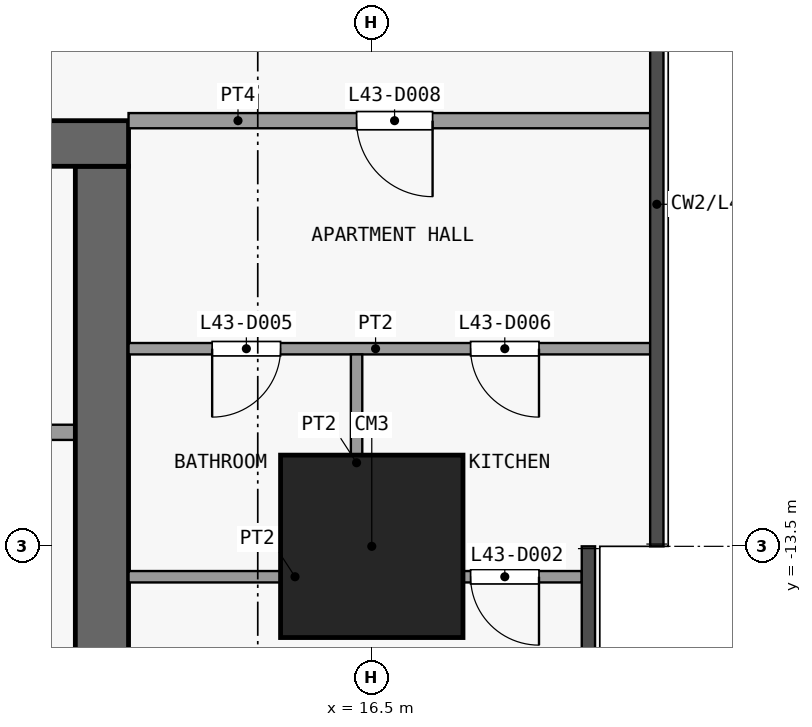
"""IFC4 building model, lengths in metres.
Left out: names, types, materials, properties, quantities, classifications, styles, units other than length and angle.
Written with IfcOpenShell. Run it as: python <this file> out.ifc"""

import sys

from ifc_helpers import new_model, si_unit, direction, frame, frame_2d, origin, origin_2d, place, context, subcontext, project, spatial, rectangle, extrude, element, fill, save


model = new_model("IFC4")
c1 = context("Model", 3, precision=1e-05, world=origin(), true_north=direction((0.0, 1.0)))
c2 = subcontext(c1, "Body", "Model", "MODEL_VIEW")
j1 = project(units=[si_unit("LENGTHUNIT", "METRE"), si_unit("PLANEANGLEUNIT", "RADIAN")], contexts=[c1])
p1 = place(None, origin())
s1 = spatial("IfcSite", under=j1, at=p1, CompositionType="ELEMENT")
p2 = place(p1, origin())
s2 = spatial("IfcBuilding", under=s1, at=p2, CompositionType="ELEMENT")
p3 = place(p2, frame((0.0, 0.0, 174.5)))
s3 = spatial("IfcBuildingStorey", under=s2, at=p3, CompositionType="ELEMENT", Elevation=174.5)
p4 = place(p3, frame((16.5, -13.5, 0.0), z_axis=(0.0, 0.0, 1.0), x_axis=(1.0, 0.0, 0.0)))
e1 = element("IfcColumn", 1, at=p4, inside=s3, PredefinedType="COLUMN", context=c2, shape_type="SweptSolid", body=[
    extrude(rectangle(XDim=2.4, YDim=2.4, at=origin_2d()), origin(), (0.0, 0.0, 1.0), 3.6),
])
p5 = place(p3, frame((-13.3, -8.2, 0.0), z_axis=(0.0, 0.0, 1.0), x_axis=(1.0, 0.0, 0.0)))
e2 = element("IfcWall", 2, at=p5, inside=s3, PredefinedType="SHEAR", context=c2, shape_type="SweptSolid", body=[
    extrude(rectangle(XDim=26.6, YDim=0.6, at=frame_2d((13.3, 0.0))), origin(), (0.0, 0.0, 1.0), 3.3),
])
p6 = place(p5, frame((7.6, 0.0, 0.0)))
e3 = element("IfcOpeningElement", 3, at=p6, cuts=e2, PredefinedType="OPENING", context=c2, shape_type="SweptSolid", body=[
    extrude(rectangle(XDim=1.8, YDim=2.1, at=frame_2d((0.9, 1.05))), frame((0.0, 0.31, 0.0), z_axis=(0.0, -1.0, 0.0), x_axis=(1.0, 0.0, 0.0)), (0.0, 0.0, 1.0), 0.62),
])
p7 = place(p5, frame((17.2, 0.0, 0.0)))
e4 = element("IfcOpeningElement", 4, at=p7, cuts=e2, PredefinedType="OPENING", context=c2, shape_type="SweptSolid", body=[
    extrude(rectangle(XDim=1.8, YDim=2.1, at=frame_2d((0.9, 1.05))), frame((0.0, 0.31, 0.0), z_axis=(0.0, -1.0, 0.0), x_axis=(1.0, 0.0, 0.0)), (0.0, 0.0, 1.0), 0.62),
])
p8 = place(p5, frame((2.525, 0.0, 0.0)))
e5 = element("IfcOpeningElement", 5, at=p8, cuts=e2, PredefinedType="OPENING", context=c2, shape_type="SweptSolid", body=[
    extrude(rectangle(XDim=0.9, YDim=2.1, at=frame_2d((0.45, 1.05))), frame((0.0, 0.31, 0.0), z_axis=(0.0, -1.0, 0.0), x_axis=(1.0, 0.0, 0.0)), (0.0, 0.0, 1.0), 0.62),
])
p9 = place(p5, frame((23.175, 0.0, 0.0)))
e6 = element("IfcOpeningElement", 6, at=p9, cuts=e2, PredefinedType="OPENING", context=c2, shape_type="SweptSolid", body=[
    extrude(rectangle(XDim=0.9, YDim=2.1, at=frame_2d((0.45, 1.05))), frame((0.0, 0.31, 0.0), z_axis=(0.0, -1.0, 0.0), x_axis=(1.0, 0.0, 0.0)), (0.0, 0.0, 1.0), 0.62),
])
p10 = place(p3, frame((12.95, -24.6, 0.0), z_axis=(0.0, 0.0, 1.0), x_axis=(0.0, 1.0, 0.0)))
e7 = element("IfcWall", 7, at=p10, inside=s3, PredefinedType="SHEAR", context=c2, shape_type="SweptSolid", body=[
    extrude(rectangle(XDim=16.1, YDim=0.7, at=frame_2d((8.05, 0.0))), origin(), (0.0, 0.0, 1.0), 3.3),
])
p11 = place(p3, frame((11.15, -12.0, 0.0), z_axis=(0.0, 0.0, 1.0), x_axis=(1.0, 0.0, 0.0)))
e8 = element("IfcWall", 8, at=p11, inside=s3, PredefinedType="PARTITIONING", context=c2, shape_type="SweptSolid", body=[
    extrude(rectangle(XDim=1.45, YDim=0.2, at=frame_2d((0.725, 0.0))), origin(), (0.0, 0.0, 1.0), 3.3),
])
p12 = place(p3, frame((13.3, -13.9, 0.0), z_axis=(0.0, 0.0, 1.0), x_axis=(1.0, 0.0, 0.0)))
e9 = element("IfcWall", 9, at=p12, inside=s3, PredefinedType="PARTITIONING", context=c2, shape_type="SweptSolid", body=[
    extrude(rectangle(XDim=5.962, YDim=0.15, at=frame_2d((2.981, 0.0))), origin(), (0.0, 0.0, 1.0), 3.3),
])
p13 = place(p12, frame((4.5, 0.0, 0.0)))
e10 = element("IfcOpeningElement", 10, at=p13, cuts=e9, PredefinedType="OPENING", context=c2, shape_type="SweptSolid", body=[
    extrude(rectangle(XDim=0.9, YDim=2.1, at=frame_2d((0.45, 1.05))), frame((0.0, 0.085, 0.0), z_axis=(0.0, -1.0, 0.0), x_axis=(1.0, 0.0, 0.0)), (0.0, 0.0, 1.0), 0.17),
])
p14 = place(p3, frame((13.3, -10.9, 0.0), z_axis=(0.0, 0.0, 1.0), x_axis=(1.0, 0.0, 0.0)))
e11 = element("IfcWall", 11, at=p14, inside=s3, PredefinedType="PARTITIONING", context=c2, shape_type="SweptSolid", body=[
    extrude(rectangle(XDim=6.863, YDim=0.15, at=frame_2d((3.431, 0.0))), origin(), (0.0, 0.0, 1.0), 3.3),
])
p15 = place(p14, frame((1.1, 0.0, 0.0)))
e12 = element("IfcOpeningElement", 12, at=p15, cuts=e11, PredefinedType="OPENING", context=c2, shape_type="SweptSolid", body=[
    extrude(rectangle(XDim=0.9, YDim=2.1, at=frame_2d((0.45, 1.05))), frame((0.0, 0.085, 0.0), z_axis=(0.0, -1.0, 0.0), x_axis=(1.0, 0.0, 0.0)), (0.0, 0.0, 1.0), 0.17),
])
p16 = place(p14, frame((4.5, 0.0, 0.0)))
e13 = element("IfcOpeningElement", 13, at=p16, cuts=e11, PredefinedType="OPENING", context=c2, shape_type="SweptSolid", body=[
    extrude(rectangle(XDim=0.9, YDim=2.1, at=frame_2d((0.45, 1.05))), frame((0.0, 0.085, 0.0), z_axis=(0.0, -1.0, 0.0), x_axis=(1.0, 0.0, 0.0)), (0.0, 0.0, 1.0), 0.17),
])
p17 = place(p3, frame((13.3, -7.9, 0.0), z_axis=(0.0, 0.0, 1.0), x_axis=(1.0, 0.0, 0.0)))
e14 = element("IfcWall", 14, at=p17, inside=s3, PredefinedType="PARTITIONING", context=c2, shape_type="SweptSolid", body=[
    extrude(rectangle(XDim=6.863, YDim=0.2, at=frame_2d((3.431, 0.0))), origin(), (0.0, 0.0, 1.0), 3.3),
])
p18 = place(p17, frame((3.0, 0.0, 0.0)))
e15 = element("IfcOpeningElement", 15, at=p18, cuts=e14, PredefinedType="OPENING", context=c2, shape_type="SweptSolid", body=[
    extrude(rectangle(XDim=1.0, YDim=2.1, at=frame_2d((0.5, 1.05))), frame((0.0, 0.11, 0.0), z_axis=(0.0, -1.0, 0.0), x_axis=(1.0, 0.0, 0.0)), (0.0, 0.0, 1.0), 0.22),
])
p19 = place(p3, frame((16.3, -13.825, 0.0), z_axis=(0.0, 0.0, 1.0), x_axis=(0.0, 1.0, 0.0)))
e16 = element("IfcWall", 16, at=p19, inside=s3, PredefinedType="PARTITIONING", context=c2, shape_type="SweptSolid", body=[
    extrude(rectangle(XDim=2.85, YDim=0.15, at=frame_2d((1.425, 0.0))), origin(), (0.0, 0.0, 1.0), 3.3),
])
p20 = place(p13, origin())
e17 = element("IfcDoor", 17, at=p20, inside=s3, OperationType="SINGLE_SWING_RIGHT", PredefinedType="DOOR", context=c2, shape_type="SweptSolid", body=[
    extrude(rectangle(XDim=0.9, YDim=2.1, at=frame_2d((0.45, 1.05))), frame((0.0, 0.025, 0.0), z_axis=(0.0, -1.0, 0.0), x_axis=(1.0, 0.0, 0.0)), (0.0, 0.0, 1.0), 0.05),
])
fill(e10, e17)
p21 = place(p15, origin())
e18 = element("IfcDoor", 18, at=p21, inside=s3, OperationType="SINGLE_SWING_LEFT", PredefinedType="DOOR", context=c2, shape_type="SweptSolid", body=[
    extrude(rectangle(XDim=0.9, YDim=2.1, at=frame_2d((0.45, 1.05))), frame((0.0, 0.025, 0.0), z_axis=(0.0, -1.0, 0.0), x_axis=(1.0, 0.0, 0.0)), (0.0, 0.0, 1.0), 0.05),
])
fill(e12, e18)
p22 = place(p16, origin())
e19 = element("IfcDoor", 19, at=p22, inside=s3, OperationType="SINGLE_SWING_RIGHT", PredefinedType="DOOR", context=c2, shape_type="SweptSolid", body=[
    extrude(rectangle(XDim=0.9, YDim=2.1, at=frame_2d((0.45, 1.05))), frame((0.0, 0.025, 0.0), z_axis=(0.0, -1.0, 0.0), x_axis=(1.0, 0.0, 0.0)), (0.0, 0.0, 1.0), 0.05),
])
fill(e13, e19)
p23 = place(p18, origin())
e20 = element("IfcDoor", 20, at=p23, inside=s3, OperationType="SINGLE_SWING_RIGHT", PredefinedType="DOOR", context=c2, shape_type="SweptSolid", body=[
    extrude(rectangle(XDim=1.0, YDim=2.1, at=frame_2d((0.5, 1.05))), frame((0.0, 0.025, 0.0), z_axis=(0.0, -1.0, 0.0), x_axis=(1.0, 0.0, 0.0)), (0.0, 0.0, 1.0), 0.05),
])
fill(e15, e20)
save(model, sys.argv[1])
